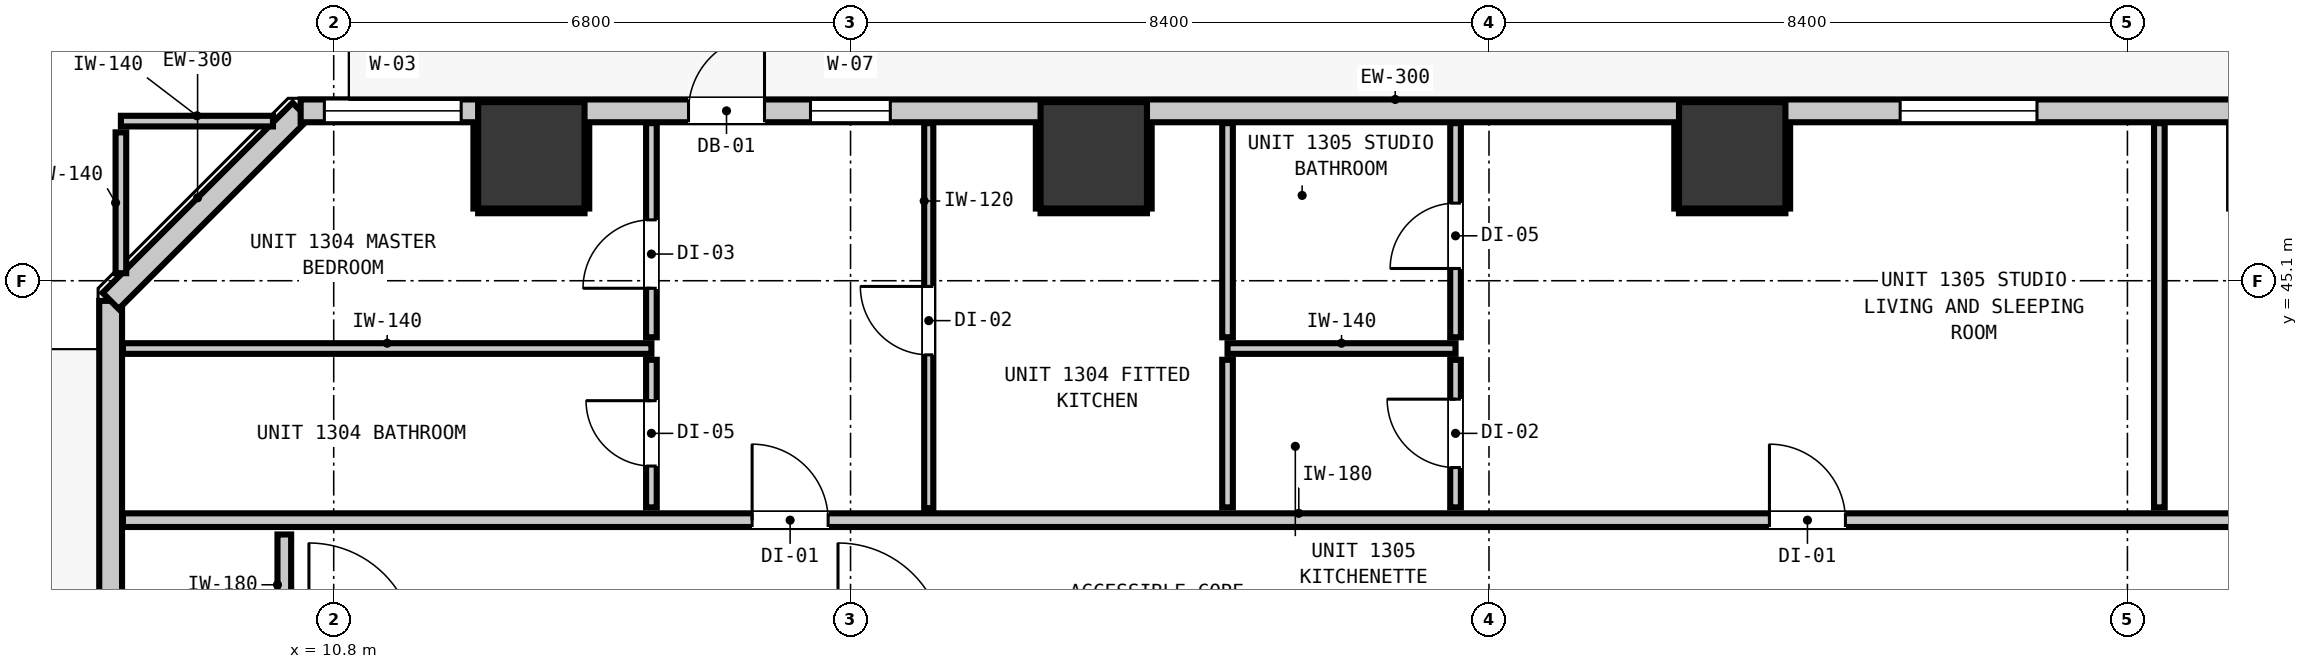
"""IFC4 building model, lengths in metres.
Left out: names, types, materials, properties, quantities, classifications, styles, units other than length and angle.
Written with IfcOpenShell. Run it as: python <this file> out.ifc"""

import sys

from ifc_helpers import new_model, si_unit, direction, frame, frame_2d, origin, origin_2d, place, context, subcontext, project, spatial, rectangle, extrude, element, fill, save


model = new_model("IFC4")
c1 = context("Model", 3, precision=1e-05, world=origin(), true_north=direction((0.0, 1.0)))
c2 = subcontext(c1, "Body", "Model", "MODEL_VIEW")
j1 = project(units=[si_unit("LENGTHUNIT", "METRE"), si_unit("PLANEANGLEUNIT", "RADIAN")], contexts=[c1])
p1 = place(None, origin())
s1 = spatial("IfcSite", under=j1, at=p1, CompositionType="ELEMENT")
p2 = place(p1, origin())
s2 = spatial("IfcBuilding", under=s1, at=p2, CompositionType="ELEMENT")
p3 = place(p2, frame((0.0, 0.0, 48.56)))
s3 = spatial("IfcBuildingStorey", under=s2, at=p3, CompositionType="ELEMENT", Elevation=48.56)
for number, where, z_axis, x_axis in (
    (1, (13.4, 46.75, 0.0), (0.0, 0.0, 1.0), (1.0, 0.0, 0.0)),
    (2, (20.8, 46.75, 0.0), (0.0, 0.0, 1.0), (1.0, 0.0, 0.0)),
    (3, (29.2, 46.75, 0.0), (0.0, 0.0, 1.0), (1.0, 0.0, 0.0)),
):
    element("IfcColumn", number, at=place(p3, frame(where, z_axis=z_axis, x_axis=x_axis)), inside=s3, PredefinedType="COLUMN", context=c2, shape_type="SweptSolid", body=[
        extrude(rectangle(XDim=1.4, YDim=1.4, at=origin_2d()), origin(), (0.0, 0.0, 1.0), 3.32),
    ])
p4 = place(p3, frame((7.865, 10.165, 0.0), z_axis=(0.0, 0.0, 1.0), x_axis=(0.0, 1.0, 0.0)))
e4 = element("IfcWall", 4, at=p4, inside=s3, PredefinedType="STANDARD", context=c2, shape_type="SweptSolid", body=[
    extrude(rectangle(XDim=34.67, YDim=0.3, at=frame_2d((17.335, 0.0))), origin(), (0.0, 0.0, 1.0), 3.06),
])
p5 = place(p4, frame((0.901, 0.0, 0.0)))
e5 = element("IfcOpeningElement", 5, at=p5, cuts=e4, PredefinedType="OPENING", context=c2, shape_type="SweptSolid", body=[
    extrude(rectangle(XDim=1.0, YDim=2.15, at=frame_2d((0.5, 1.075))), frame((0.0, 0.16, 0.0), z_axis=(0.0, -1.0, 0.0), x_axis=(1.0, 0.0, 0.0)), (0.0, 0.0, 1.0), 0.32),
])
p6 = place(p3, frame((7.865, 44.835, 0.0), z_axis=(0.0, 0.0, 1.0), x_axis=(0.707106781187, 0.707106781187, 0.0)))
e6 = element("IfcWall", 6, at=p6, inside=s3, PredefinedType="STANDARD", context=c2, shape_type="SweptSolid", body=[
    extrude(rectangle(XDim=3.536, YDim=0.3, at=frame_2d((1.768, 0.0))), origin(), (0.0, 0.0, 1.0), 3.06),
])
p7 = place(p3, frame((10.365, 47.335, 0.0), z_axis=(0.0, 0.0, 1.0), x_axis=(1.0, 0.0, 0.0)))
e7 = element("IfcWall", 7, at=p7, inside=s3, PredefinedType="STANDARD", context=c2, shape_type="SweptSolid", body=[
    extrude(rectangle(XDim=37.47, YDim=0.3, at=frame_2d((18.735, 0.0))), origin(), (0.0, 0.0, 1.0), 3.06),
])
p8 = place(p7, frame((5.103, 0.0, 0.0)))
e8 = element("IfcOpeningElement", 8, at=p8, cuts=e7, PredefinedType="OPENING", context=c2, shape_type="SweptSolid", body=[
    extrude(rectangle(XDim=1.0, YDim=2.15, at=frame_2d((0.5, 1.075))), frame((0.0, 0.16, 0.0), z_axis=(0.0, -1.0, 0.0), x_axis=(1.0, 0.0, 0.0)), (0.0, 0.0, 1.0), 0.32),
])
p9 = place(p7, frame((6.708, 0.0, 0.85)))
e9 = element("IfcOpeningElement", 9, at=p9, cuts=e7, PredefinedType="OPENING", context=c2, shape_type="SweptSolid", body=[
    extrude(rectangle(XDim=1.05, YDim=1.65, at=frame_2d((0.525, 0.825))), frame((0.0, 0.16, 0.0), z_axis=(0.0, -1.0, 0.0), x_axis=(1.0, 0.0, 0.0)), (0.0, 0.0, 1.0), 0.32),
])
p10 = place(p7, frame((0.312, 0.0, 0.85)))
e10 = element("IfcOpeningElement", 10, at=p10, cuts=e7, PredefinedType="OPENING", context=c2, shape_type="SweptSolid", body=[
    extrude(rectangle(XDim=1.8, YDim=1.9, at=frame_2d((0.9, 0.95))), frame((0.0, 0.16, 0.0), z_axis=(0.0, -1.0, 0.0), x_axis=(1.0, 0.0, 0.0)), (0.0, 0.0, 1.0), 0.32),
])
p11 = place(p7, frame((21.045, 0.0, 0.85)))
e11 = element("IfcOpeningElement", 11, at=p11, cuts=e7, PredefinedType="OPENING", context=c2, shape_type="SweptSolid", body=[
    extrude(rectangle(XDim=1.8, YDim=1.9, at=frame_2d((0.9, 0.95))), frame((0.0, 0.16, 0.0), z_axis=(0.0, -1.0, 0.0), x_axis=(1.0, 0.0, 0.0)), (0.0, 0.0, 1.0), 0.32),
])
p12 = place(p7, frame((31.207, 0.0, 0.85)))
e12 = element("IfcOpeningElement", 12, at=p12, cuts=e7, PredefinedType="OPENING", context=c2, shape_type="SweptSolid", body=[
    extrude(rectangle(XDim=1.8, YDim=1.9, at=frame_2d((0.9, 0.95))), frame((0.0, 0.16, 0.0), z_axis=(0.0, -1.0, 0.0), x_axis=(1.0, 0.0, 0.0)), (0.0, 0.0, 1.0), 0.32),
])
p13 = place(p3, frame((8.027, 41.95, 0.0), z_axis=(0.0, 0.0, 1.0), x_axis=(1.0, 0.0, 0.0)))
e13 = element("IfcWall", 13, at=p13, inside=s3, PredefinedType="PARTITIONING", context=c2, shape_type="SweptSolid", body=[
    extrude(rectangle(XDim=28.905, YDim=0.18, at=frame_2d((14.452, 0.0))), origin(), (0.0, 0.0, 1.0), 3.06),
])
p14 = place(p13, frame((8.278, 0.0, 0.0)))
e14 = element("IfcOpeningElement", 14, at=p14, cuts=e13, PredefinedType="OPENING", context=c2, shape_type="SweptSolid", body=[
    extrude(rectangle(XDim=1.0, YDim=2.15, at=frame_2d((0.5, 1.075))), frame((0.0, 0.1, 0.0), z_axis=(0.0, -1.0, 0.0), x_axis=(1.0, 0.0, 0.0)), (0.0, 0.0, 1.0), 0.2),
])
p15 = place(p13, frame((21.663, 0.0, 0.0)))
e15 = element("IfcOpeningElement", 15, at=p15, cuts=e13, PredefinedType="OPENING", context=c2, shape_type="SweptSolid", body=[
    extrude(rectangle(XDim=1.0, YDim=2.15, at=frame_2d((0.5, 1.075))), frame((0.0, 0.1, 0.0), z_axis=(0.0, -1.0, 0.0), x_axis=(1.0, 0.0, 0.0)), (0.0, 0.0, 1.0), 0.2),
])
p16 = place(p3, frame((8.027, 44.208, 0.0), z_axis=(0.0, 0.0, 1.0), x_axis=(1.0, 0.0, 0.0)))
e16 = element("IfcWall", 16, at=p16, inside=s3, PredefinedType="PARTITIONING", context=c2, shape_type="SweptSolid", body=[
    extrude(rectangle(XDim=6.953, YDim=0.14, at=frame_2d((3.477, 0.0))), origin(), (0.0, 0.0, 1.0), 3.06),
])
p17 = place(p3, frame((22.56, 44.208, 0.0), z_axis=(0.0, 0.0, 1.0), x_axis=(1.0, 0.0, 0.0)))
e17 = element("IfcWall", 17, at=p17, inside=s3, PredefinedType="PARTITIONING", context=c2, shape_type="SweptSolid", body=[
    extrude(rectangle(XDim=3.0, YDim=0.14, at=frame_2d((1.5, 0.0))), origin(), (0.0, 0.0, 1.0), 3.06),
])
p18 = place(p3, frame((8.0, 47.2, 0.0), z_axis=(0.0, 0.0, 1.0), x_axis=(1.0, 0.0, 0.0)))
e18 = element("IfcWall", 18, at=p18, inside=s3, PredefinedType="PARTITIONING", context=c2, shape_type="SweptSolid", body=[
    extrude(rectangle(XDim=2.001, YDim=0.14, at=frame_2d((1.0, 0.0))), origin(), (0.0, 0.0, 1.0), 3.06),
])
p19 = place(p3, frame((10.15, 40.438, 0.0), z_axis=(0.0, 0.0, 1.0), x_axis=(0.0, 1.0, 0.0)))
e19 = element("IfcWall", 19, at=p19, inside=s3, PredefinedType="PARTITIONING", context=c2, shape_type="SweptSolid", body=[
    extrude(rectangle(XDim=1.324, YDim=0.18, at=frame_2d((0.662, 0.0))), origin(), (0.0, 0.0, 1.0), 2.445),
])
p20 = place(p3, frame((8.0, 45.199, 0.0), z_axis=(0.0, 0.0, 1.0), x_axis=(0.0, 1.0, 0.0)))
e20 = element("IfcWall", 20, at=p20, inside=s3, PredefinedType="PARTITIONING", context=c2, shape_type="SweptSolid", body=[
    extrude(rectangle(XDim=1.853, YDim=0.14, at=frame_2d((0.927, 0.0))), origin(), (0.0, 0.0, 1.0), 3.06),
])
p21 = place(p3, frame((14.98, 42.118, 0.0), z_axis=(0.0, 0.0, 1.0), x_axis=(0.0, 1.0, 0.0)))
e21 = element("IfcWall", 21, at=p21, inside=s3, PredefinedType="PARTITIONING", context=c2, shape_type="SweptSolid", body=[
    extrude(rectangle(XDim=1.942, YDim=0.14, at=frame_2d((0.971, 0.0))), origin(), (0.0, 0.0, 1.0), 3.06),
])
p22 = place(p21, frame((0.544, 0.0, 0.0)))
e22 = element("IfcOpeningElement", 22, at=p22, cuts=e21, PredefinedType="OPENING", context=c2, shape_type="SweptSolid", body=[
    extrude(rectangle(XDim=0.86, YDim=2.02, at=frame_2d((0.43, 1.01))), frame((0.0, 0.08, 0.0), z_axis=(0.0, -1.0, 0.0), x_axis=(1.0, 0.0, 0.0)), (0.0, 0.0, 1.0), 0.16),
])
p23 = place(p3, frame((14.98, 44.356, 0.0), z_axis=(0.0, 0.0, 1.0), x_axis=(0.0, 1.0, 0.0)))
e23 = element("IfcWall", 23, at=p23, inside=s3, PredefinedType="PARTITIONING", context=c2, shape_type="SweptSolid", body=[
    extrude(rectangle(XDim=2.817, YDim=0.14, at=frame_2d((1.409, 0.0))), origin(), (0.0, 0.0, 1.0), 3.06),
])
p24 = place(p23, frame((0.645, 0.0, 0.0)))
e24 = element("IfcOpeningElement", 24, at=p24, cuts=e23, PredefinedType="OPENING", context=c2, shape_type="SweptSolid", body=[
    extrude(rectangle(XDim=0.9, YDim=2.1, at=frame_2d((0.45, 1.05))), frame((0.0, 0.08, 0.0), z_axis=(0.0, -1.0, 0.0), x_axis=(1.0, 0.0, 0.0)), (0.0, 0.0, 1.0), 0.16),
])
p25 = place(p3, frame((22.56, 42.118, 0.0), z_axis=(0.0, 0.0, 1.0), x_axis=(0.0, 1.0, 0.0)))
e25 = element("IfcWall", 25, at=p25, inside=s3, PredefinedType="PARTITIONING", context=c2, shape_type="SweptSolid", body=[
    extrude(rectangle(XDim=1.942, YDim=0.14, at=frame_2d((0.971, 0.0))), origin(), (0.0, 0.0, 1.0), 3.06),
])
p26 = place(p3, frame((22.56, 44.356, 0.0), z_axis=(0.0, 0.0, 1.0), x_axis=(0.0, 1.0, 0.0)))
e26 = element("IfcWall", 26, at=p26, inside=s3, PredefinedType="PARTITIONING", context=c2, shape_type="SweptSolid", body=[
    extrude(rectangle(XDim=2.817, YDim=0.14, at=frame_2d((1.409, 0.0))), origin(), (0.0, 0.0, 1.0), 3.06),
])
p27 = place(p3, frame((25.56, 42.118, 0.0), z_axis=(0.0, 0.0, 1.0), x_axis=(0.0, 1.0, 0.0)))
e27 = element("IfcWall", 27, at=p27, inside=s3, PredefinedType="PARTITIONING", context=c2, shape_type="SweptSolid", body=[
    extrude(rectangle(XDim=1.942, YDim=0.14, at=frame_2d((0.971, 0.0))), origin(), (0.0, 0.0, 1.0), 3.06),
])
p28 = place(p27, frame((0.524, 0.0, 0.0)))
e28 = element("IfcOpeningElement", 28, at=p28, cuts=e27, PredefinedType="OPENING", context=c2, shape_type="SweptSolid", body=[
    extrude(rectangle(XDim=0.9, YDim=2.1, at=frame_2d((0.45, 1.05))), frame((0.0, 0.08, 0.0), z_axis=(0.0, -1.0, 0.0), x_axis=(1.0, 0.0, 0.0)), (0.0, 0.0, 1.0), 0.16),
])
p29 = place(p3, frame((25.56, 44.356, 0.0), z_axis=(0.0, 0.0, 1.0), x_axis=(0.0, 1.0, 0.0)))
e29 = element("IfcWall", 29, at=p29, inside=s3, PredefinedType="PARTITIONING", context=c2, shape_type="SweptSolid", body=[
    extrude(rectangle(XDim=2.817, YDim=0.14, at=frame_2d((1.409, 0.0))), origin(), (0.0, 0.0, 1.0), 3.06),
])
p30 = place(p29, frame((0.905, 0.0, 0.0)))
e30 = element("IfcOpeningElement", 30, at=p30, cuts=e29, PredefinedType="OPENING", context=c2, shape_type="SweptSolid", body=[
    extrude(rectangle(XDim=0.86, YDim=2.02, at=frame_2d((0.43, 1.01))), frame((0.0, 0.08, 0.0), z_axis=(0.0, -1.0, 0.0), x_axis=(1.0, 0.0, 0.0)), (0.0, 0.0, 1.0), 0.16),
])
p31 = place(p3, frame((34.82, 42.118, 0.0), z_axis=(0.0, 0.0, 1.0), x_axis=(0.0, 1.0, 0.0)))
e31 = element("IfcWall", 31, at=p31, inside=s3, PredefinedType="PARTITIONING", context=c2, shape_type="SweptSolid", body=[
    extrude(rectangle(XDim=5.055, YDim=0.14, at=frame_2d((2.528, 0.0))), origin(), (0.0, 0.0, 1.0), 3.06),
])
p32 = place(p3, frame((18.629, 42.108, 0.0), z_axis=(0.0, 0.0, 1.0), x_axis=(0.0, 1.0, 0.0)))
e32 = element("IfcWall", 32, at=p32, inside=s3, PredefinedType="PARTITIONING", context=c2, shape_type="SweptSolid", body=[
    extrude(rectangle(XDim=5.065, YDim=0.12, at=frame_2d((2.533, 0.0))), origin(), (0.0, 0.0, 1.0), 3.06),
])
p33 = place(p32, frame((2.017, 0.0, 0.0)))
e33 = element("IfcOpeningElement", 33, at=p33, cuts=e32, PredefinedType="OPENING", context=c2, shape_type="SweptSolid", body=[
    extrude(rectangle(XDim=0.9, YDim=2.1, at=frame_2d((0.45, 1.05))), frame((0.0, 0.07, 0.0), z_axis=(0.0, -1.0, 0.0), x_axis=(1.0, 0.0, 0.0)), (0.0, 0.0, 1.0), 0.14),
])
p34 = place(p3, frame((12.7, 46.018, 0.0), z_axis=(0.0, 0.0, 1.0), x_axis=(1.0, 0.0, 0.0)))
e34 = element("IfcWall", 34, at=p34, inside=s3, PredefinedType="PARTITIONING", context=c2, shape_type="SweptSolid", body=[
    extrude(rectangle(XDim=1.4, YDim=0.06, at=frame_2d((0.7, 0.0))), origin(), (0.0, 0.0, 1.0), 1.45),
])
for number, where, z_axis, x_axis in (
    (35, (12.668, 46.05, 0.0), (0.0, 0.0, 1.0), (0.0, 1.0, 0.0)),
    (36, (14.132, 46.05, 0.0), (0.0, 0.0, 1.0), (0.0, 1.0, 0.0)),
):
    element("IfcWall", number, at=place(p3, frame(where, z_axis=z_axis, x_axis=x_axis)), inside=s3, PredefinedType="PARTITIONING", context=c2, shape_type="SweptSolid", body=[
        extrude(rectangle(XDim=1.12, YDim=0.06, at=frame_2d((0.56, 0.0))), origin(), (0.0, 0.0, 1.0), 1.45),
    ])
p35 = place(p3, frame((20.1, 46.018, 0.0), z_axis=(0.0, 0.0, 1.0), x_axis=(1.0, 0.0, 0.0)))
e37 = element("IfcWall", 37, at=p35, inside=s3, PredefinedType="PARTITIONING", context=c2, shape_type="SweptSolid", body=[
    extrude(rectangle(XDim=1.4, YDim=0.06, at=frame_2d((0.7, 0.0))), origin(), (0.0, 0.0, 1.0), 1.45),
])
for number, where, z_axis, x_axis in (
    (38, (20.068, 46.05, 0.0), (0.0, 0.0, 1.0), (0.0, 1.0, 0.0)),
    (39, (21.532, 46.05, 0.0), (0.0, 0.0, 1.0), (0.0, 1.0, 0.0)),
):
    element("IfcWall", number, at=place(p3, frame(where, z_axis=z_axis, x_axis=x_axis)), inside=s3, PredefinedType="PARTITIONING", context=c2, shape_type="SweptSolid", body=[
        extrude(rectangle(XDim=1.12, YDim=0.06, at=frame_2d((0.56, 0.0))), origin(), (0.0, 0.0, 1.0), 1.45),
    ])
p36 = place(p3, frame((28.5, 46.018, 0.0), z_axis=(0.0, 0.0, 1.0), x_axis=(1.0, 0.0, 0.0)))
e40 = element("IfcWall", 40, at=p36, inside=s3, PredefinedType="PARTITIONING", context=c2, shape_type="SweptSolid", body=[
    extrude(rectangle(XDim=1.4, YDim=0.06, at=frame_2d((0.7, 0.0))), origin(), (0.0, 0.0, 1.0), 1.45),
])
for number, where, z_axis, x_axis in (
    (41, (28.468, 46.05, 0.0), (0.0, 0.0, 1.0), (0.0, 1.0, 0.0)),
    (42, (29.932, 46.05, 0.0), (0.0, 0.0, 1.0), (0.0, 1.0, 0.0)),
):
    element("IfcWall", number, at=place(p3, frame(where, z_axis=z_axis, x_axis=x_axis)), inside=s3, PredefinedType="PARTITIONING", context=c2, shape_type="SweptSolid", body=[
        extrude(rectangle(XDim=1.12, YDim=0.06, at=frame_2d((0.56, 0.0))), origin(), (0.0, 0.0, 1.0), 1.45),
    ])
p37 = place(p8, origin())
e43 = element("IfcDoor", 43, at=p37, inside=s3, OperationType="SINGLE_SWING_RIGHT", PredefinedType="DOOR", context=c2, shape_type="SweptSolid", body=[
    extrude(rectangle(XDim=1.0, YDim=2.15, at=frame_2d((0.5, 1.075))), frame((0.0, 0.025, 0.0), z_axis=(0.0, -1.0, 0.0), x_axis=(1.0, 0.0, 0.0)), (0.0, 0.0, 1.0), 0.05),
])
fill(e8, e43)
p38 = place(p9, origin())
e44 = element("IfcWindow", 44, at=p38, inside=s3, PartitioningType="SINGLE_PANEL", PredefinedType="WINDOW", context=c2, shape_type="SweptSolid", body=[
    extrude(rectangle(XDim=1.05, YDim=1.65, at=frame_2d((0.525, 0.825))), frame((0.0, 0.03, 0.0), z_axis=(0.0, -1.0, 0.0), x_axis=(1.0, 0.0, 0.0)), (0.0, 0.0, 1.0), 0.06),
])
fill(e9, e44)
p39 = place(p10, origin())
e45 = element("IfcWindow", 45, at=p39, inside=s3, PartitioningType="SINGLE_PANEL", PredefinedType="WINDOW", context=c2, shape_type="SweptSolid", body=[
    extrude(rectangle(XDim=1.8, YDim=1.9, at=frame_2d((0.9, 0.95))), frame((0.0, 0.03, 0.0), z_axis=(0.0, -1.0, 0.0), x_axis=(1.0, 0.0, 0.0)), (0.0, 0.0, 1.0), 0.06),
])
fill(e10, e45)
p40 = place(p11, origin())
e46 = element("IfcWindow", 46, at=p40, inside=s3, PartitioningType="SINGLE_PANEL", PredefinedType="WINDOW", context=c2, shape_type="SweptSolid", body=[
    extrude(rectangle(XDim=1.8, YDim=1.9, at=frame_2d((0.9, 0.95))), frame((0.0, 0.03, 0.0), z_axis=(0.0, -1.0, 0.0), x_axis=(1.0, 0.0, 0.0)), (0.0, 0.0, 1.0), 0.06),
])
fill(e11, e46)
p41 = place(p14, origin())
e47 = element("IfcDoor", 47, at=p41, inside=s3, OperationType="SINGLE_SWING_LEFT", PredefinedType="DOOR", context=c2, shape_type="SweptSolid", body=[
    extrude(rectangle(XDim=1.0, YDim=2.15, at=frame_2d((0.5, 1.075))), frame((0.0, 0.025, 0.0), z_axis=(0.0, -1.0, 0.0), x_axis=(1.0, 0.0, 0.0)), (0.0, 0.0, 1.0), 0.05),
])
fill(e14, e47)
p42 = place(p22, origin())
e48 = element("IfcDoor", 48, at=p42, inside=s3, OperationType="SINGLE_SWING_RIGHT", PredefinedType="DOOR", context=c2, shape_type="SweptSolid", body=[
    extrude(rectangle(XDim=0.86, YDim=2.02, at=frame_2d((0.43, 1.01))), frame((0.0, 0.025, 0.0), z_axis=(0.0, -1.0, 0.0), x_axis=(1.0, 0.0, 0.0)), (0.0, 0.0, 1.0), 0.05),
])
fill(e22, e48)
p43 = place(p24, origin())
e49 = element("IfcDoor", 49, at=p43, inside=s3, OperationType="SINGLE_SWING_LEFT", PredefinedType="DOOR", context=c2, shape_type="SweptSolid", body=[
    extrude(rectangle(XDim=0.9, YDim=2.1, at=frame_2d((0.45, 1.05))), frame((0.0, 0.025, 0.0), z_axis=(0.0, -1.0, 0.0), x_axis=(1.0, 0.0, 0.0)), (0.0, 0.0, 1.0), 0.05),
])
fill(e24, e49)
p44 = place(p33, origin())
e50 = element("IfcDoor", 50, at=p44, inside=s3, OperationType="SINGLE_SWING_RIGHT", PredefinedType="DOOR", context=c2, shape_type="SweptSolid", body=[
    extrude(rectangle(XDim=0.9, YDim=2.1, at=frame_2d((0.45, 1.05))), frame((0.0, 0.025, 0.0), z_axis=(0.0, -1.0, 0.0), x_axis=(1.0, 0.0, 0.0)), (0.0, 0.0, 1.0), 0.05),
])
fill(e33, e50)
p45 = place(p15, origin())
e51 = element("IfcDoor", 51, at=p45, inside=s3, OperationType="SINGLE_SWING_LEFT", PredefinedType="DOOR", context=c2, shape_type="SweptSolid", body=[
    extrude(rectangle(XDim=1.0, YDim=2.15, at=frame_2d((0.5, 1.075))), frame((0.0, 0.025, 0.0), z_axis=(0.0, -1.0, 0.0), x_axis=(1.0, 0.0, 0.0)), (0.0, 0.0, 1.0), 0.05),
])
fill(e15, e51)
p46 = place(p28, origin())
e52 = element("IfcDoor", 52, at=p46, inside=s3, OperationType="SINGLE_SWING_RIGHT", PredefinedType="DOOR", context=c2, shape_type="SweptSolid", body=[
    extrude(rectangle(XDim=0.9, YDim=2.1, at=frame_2d((0.45, 1.05))), frame((0.0, 0.025, 0.0), z_axis=(0.0, -1.0, 0.0), x_axis=(1.0, 0.0, 0.0)), (0.0, 0.0, 1.0), 0.05),
])
fill(e28, e52)
p47 = place(p30, origin())
e53 = element("IfcDoor", 53, at=p47, inside=s3, OperationType="SINGLE_SWING_LEFT", PredefinedType="DOOR", context=c2, shape_type="SweptSolid", body=[
    extrude(rectangle(XDim=0.86, YDim=2.02, at=frame_2d((0.43, 1.01))), frame((0.0, 0.025, 0.0), z_axis=(0.0, -1.0, 0.0), x_axis=(1.0, 0.0, 0.0)), (0.0, 0.0, 1.0), 0.05),
])
fill(e30, e53)
save(model, sys.argv[1])
